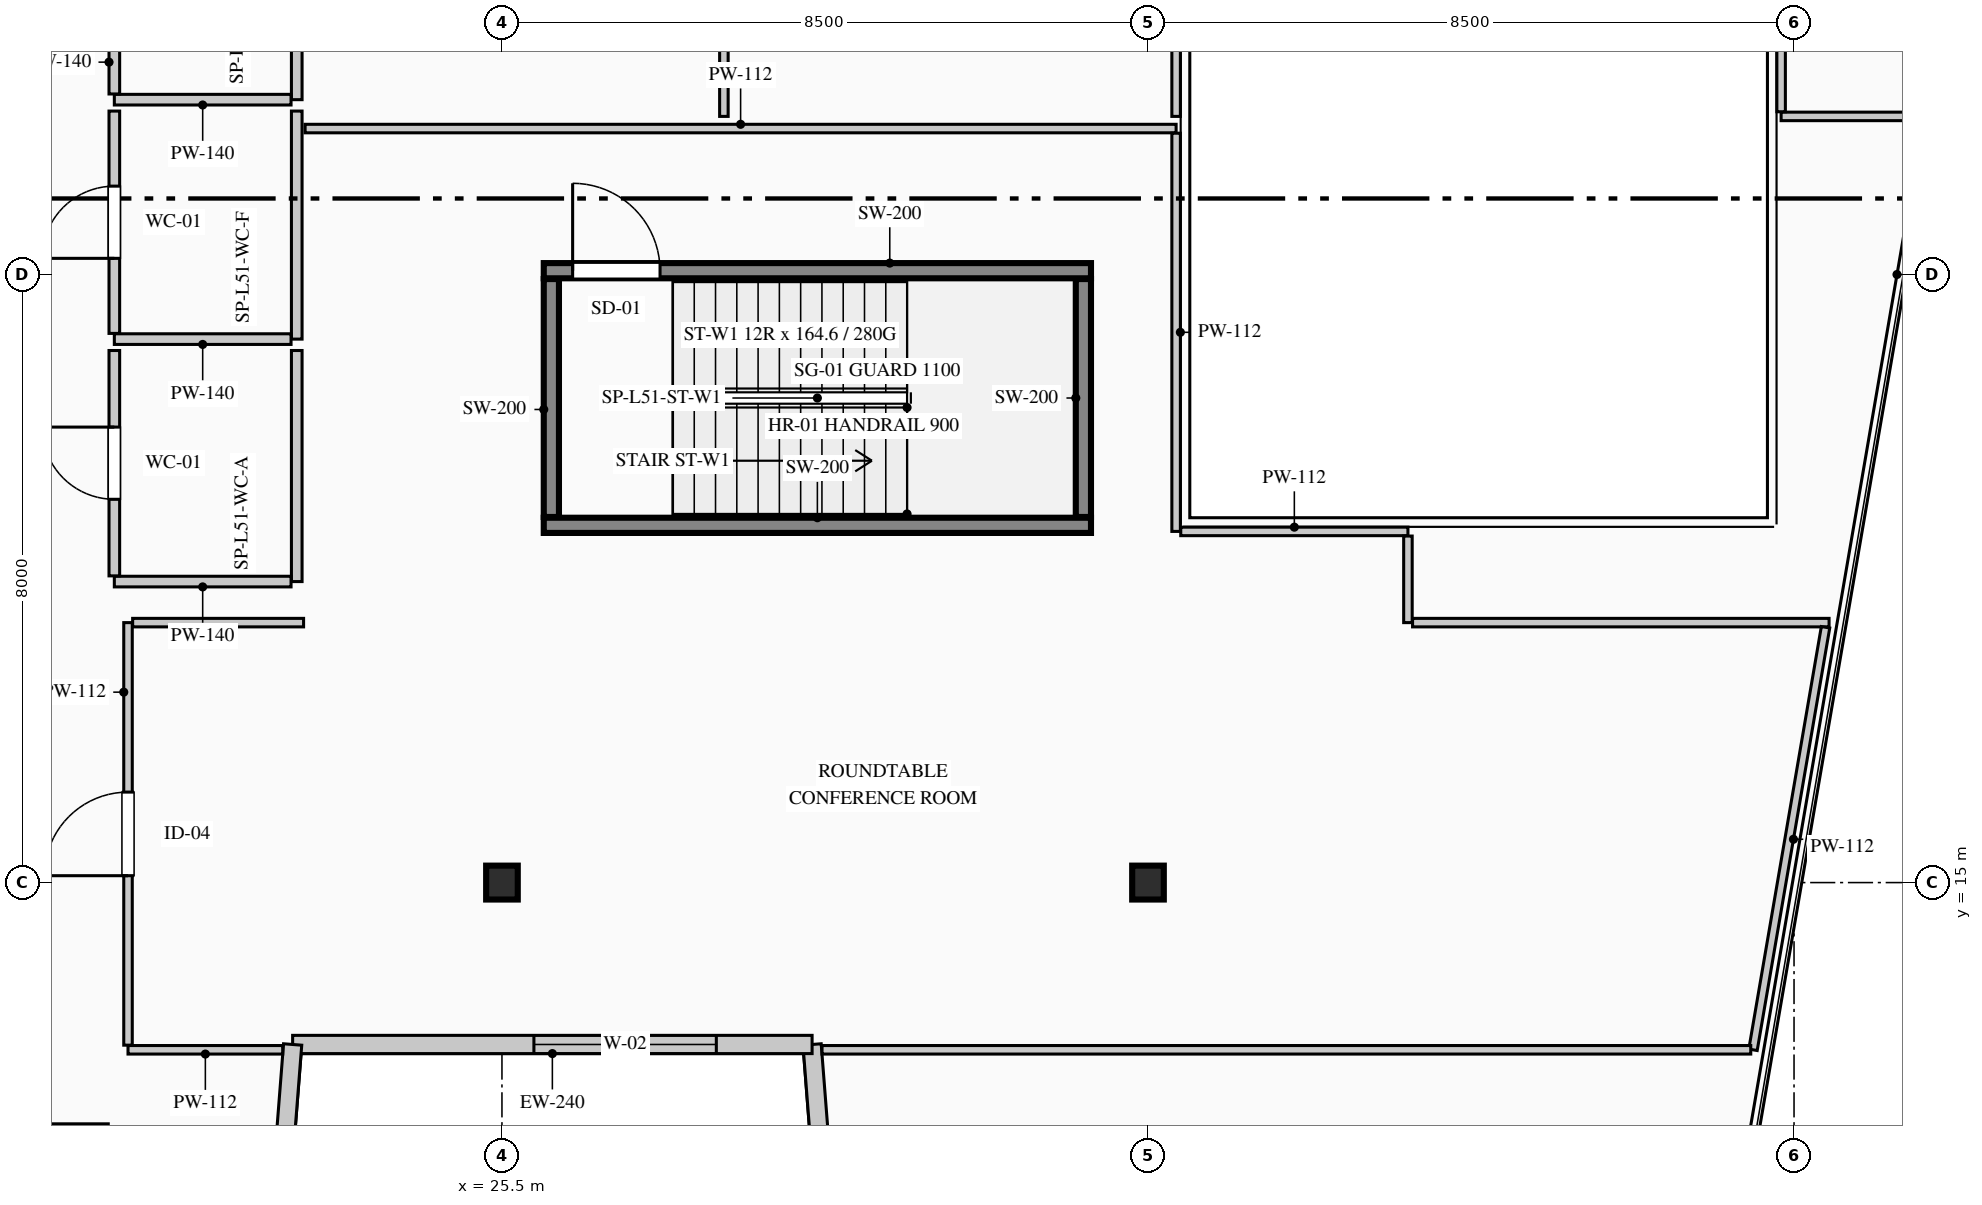
"""IFC4 building model, lengths in metres.
Left out: names, types, materials, properties, quantities, classifications, styles, units other than length and angle.
Written with IfcOpenShell. Run it as: python <this file> out.ifc"""

import sys

from ifc_helpers import new_model, si_unit, direction, frame, frame_2d, origin, origin_2d, place, context, subcontext, project, spatial, rectangle, i_section, extrude, element, fill, save


model = new_model("IFC4")
c1 = context("Model", 3, precision=1e-05, world=origin(), true_north=direction((0.0, 1.0)))
c2 = subcontext(c1, "Body", "Model", "MODEL_VIEW")
j1 = project(units=[si_unit("LENGTHUNIT", "METRE"), si_unit("PLANEANGLEUNIT", "RADIAN")], contexts=[c1])
p1 = place(None, origin())
s1 = spatial("IfcSite", under=j1, at=p1, CompositionType="ELEMENT")
p2 = place(p1, origin())
s2 = spatial("IfcBuilding", under=s1, at=p2, CompositionType="ELEMENT")
p3 = place(p2, frame((0.0, 0.0, 215.35)))
s3 = spatial("IfcBuildingStorey", under=s2, at=p3, CompositionType="ELEMENT", Elevation=215.35)
p4 = place(p3, frame((26.05, 19.7, 0.0), z_axis=(0.0, 0.0, 1.0), x_axis=(1.0, 0.0, 0.0)))
e1 = element("IfcWall", 1, at=p4, inside=s3, PredefinedType="SHEAR", context=c2, shape_type="SweptSolid", body=[
    extrude(rectangle(XDim=7.2, YDim=0.2, at=frame_2d((3.6, 0.0))), origin(), (0.0, 0.0, 1.0), 3.95),
])
p5 = place(p3, frame((26.05, 23.05, 0.0), z_axis=(0.0, 0.0, 1.0), x_axis=(1.0, 0.0, 0.0)))
e2 = element("IfcWall", 2, at=p5, inside=s3, PredefinedType="SHEAR", context=c2, shape_type="SweptSolid", body=[
    extrude(rectangle(XDim=7.2, YDim=0.2, at=frame_2d((3.6, 0.0))), origin(), (0.0, 0.0, 1.0), 3.95),
])
p6 = place(p5, frame((0.38, 0.0, 0.0)))
e3 = element("IfcOpeningElement", 3, at=p6, cuts=e2, PredefinedType="OPENING", context=c2, shape_type="SweptSolid", body=[
    extrude(rectangle(XDim=1.15, YDim=2.2, at=frame_2d((0.575, 1.1))), frame((0.0, 0.11, 0.0), z_axis=(0.0, -1.0, 0.0), x_axis=(1.0, 0.0, 0.0)), (0.0, 0.0, 1.0), 0.22),
])
for number, where, z_axis, x_axis in (
    (4, (26.15, 19.81, 0.0), (0.0, 0.0, 1.0), (0.0, 1.0, 0.0)),
    (5, (33.15, 19.81, 0.0), (0.0, 0.0, 1.0), (0.0, 1.0, 0.0)),
):
    element("IfcWall", number, at=place(p3, frame(where, z_axis=z_axis, x_axis=x_axis)), inside=s3, PredefinedType="SHEAR", context=c2, shape_type="SweptSolid", body=[
        extrude(rectangle(XDim=3.13, YDim=0.2, at=frame_2d((1.565, 0.0))), origin(), (0.0, 0.0, 1.0), 3.95),
    ])
for number, where, z_axis, x_axis in (
    (6, (25.5, 15.0, 0.0), (0.0, 0.0, 1.0), (1.0, 0.0, 0.0)),
    (7, (34.0, 15.0, 0.0), (0.0, 0.0, 1.0), (1.0, 0.0, 0.0)),
):
    element("IfcColumn", number, at=place(p3, frame(where, z_axis=z_axis, x_axis=x_axis)), inside=s3, PredefinedType="COLUMN", context=c2, shape_type="SweptSolid", body=[
        extrude(i_section(OverallWidth=0.416, OverallDepth=0.446, WebThickness=0.039, FlangeThickness=0.063, FilletRadius=0.015, at=origin_2d()), origin(), (0.0, 0.0, 1.0), 3.95),
    ])
p7 = place(p3, frame((30.381, 2.62, 0.0), z_axis=(0.0, 0.0, 1.0), x_axis=(-0.077816860153, 0.996967670627, 0.0)))
e8 = element("IfcWall", 8, at=p7, inside=s3, PredefinedType="STANDARD", context=c2, shape_type="SweptSolid", body=[
    extrude(rectangle(XDim=10.281, YDim=0.24, at=frame_2d((5.141, 0.0))), origin(), (0.0, 0.0, 1.0), 3.7),
])
p8 = place(p7, frame((5.38, 0.0, 0.9)))
e9 = element("IfcOpeningElement", 9, at=p8, cuts=e8, PredefinedType="OPENING", context=c2, shape_type="SweptSolid", body=[
    extrude(rectangle(XDim=2.4, YDim=2.1, at=frame_2d((1.2, 1.05))), frame((0.0, 0.13, 0.0), z_axis=(0.0, -1.0, 0.0), x_axis=(1.0, 0.0, 0.0)), (0.0, 0.0, 1.0), 0.26),
])
p9 = place(p3, frame((29.581, 12.87, 0.0), z_axis=(0.0, 0.0, 1.0), x_axis=(-1.0, 0.0, 0.0)))
e10 = element("IfcWall", 10, at=p9, inside=s3, PredefinedType="STANDARD", context=c2, shape_type="SweptSolid", body=[
    extrude(rectangle(XDim=6.834, YDim=0.24, at=frame_2d((3.417, 0.0))), origin(), (0.0, 0.0, 1.0), 3.7),
])
p10 = place(p9, frame((1.26, 0.0, 0.9)))
e11 = element("IfcOpeningElement", 11, at=p10, cuts=e10, PredefinedType="OPENING", context=c2, shape_type="SweptSolid", body=[
    extrude(rectangle(XDim=2.4, YDim=2.1, at=frame_2d((1.2, 1.05))), frame((0.0, 0.13, 0.0), z_axis=(0.0, -1.0, 0.0), x_axis=(1.0, 0.0, 0.0)), (0.0, 0.0, 1.0), 0.26),
])
p11 = place(p3, frame((22.746, 12.87, 0.0), z_axis=(0.0, 0.0, 1.0), x_axis=(-0.077816860153, -0.996967670627, 0.0)))
e12 = element("IfcWall", 12, at=p11, inside=s3, PredefinedType="STANDARD", context=c2, shape_type="SweptSolid", body=[
    extrude(rectangle(XDim=10.281, YDim=0.24, at=frame_2d((5.141, 0.0))), origin(), (0.0, 0.0, 1.0), 3.7),
])
p12 = place(p11, frame((2.501, 0.0, 0.9)))
e13 = element("IfcOpeningElement", 13, at=p12, cuts=e12, PredefinedType="OPENING", context=c2, shape_type="SweptSolid", body=[
    extrude(rectangle(XDim=2.4, YDim=2.1, at=frame_2d((1.2, 1.05))), frame((0.0, 0.13, 0.0), z_axis=(0.0, -1.0, 0.0), x_axis=(1.0, 0.0, 0.0)), (0.0, 0.0, 1.0), 0.26),
])
p13 = place(p3, frame((22.8, 28.95, 0.0), z_axis=(0.0, 0.0, 1.0), x_axis=(0.0, -1.0, 0.0)))
e14 = element("IfcWall", 14, at=p13, inside=s3, PredefinedType="PARTITIONING", context=c2, shape_type="SweptSolid", body=[
    extrude(rectangle(XDim=3.65, YDim=0.14, at=frame_2d((1.825, 0.0))), origin(), (0.0, 0.0, 1.0), 3.325),
])
p14 = place(p3, frame((22.725, 25.3, 0.0), z_axis=(0.0, 0.0, 1.0), x_axis=(-1.0, 0.0, 0.0)))
e15 = element("IfcWall", 15, at=p14, inside=s3, PredefinedType="PARTITIONING", context=c2, shape_type="SweptSolid", body=[
    extrude(rectangle(XDim=2.325, YDim=0.14, at=frame_2d((1.163, 0.0))), origin(), (0.0, 0.0, 1.0), 3.7),
])
p15 = place(p3, frame((20.4, 25.375, 0.0), z_axis=(0.0, 0.0, 1.0), x_axis=(0.0, 1.0, 0.0)))
e16 = element("IfcWall", 16, at=p15, inside=s3, PredefinedType="PARTITIONING", context=c2, shape_type="SweptSolid", body=[
    extrude(rectangle(XDim=3.575, YDim=0.14, at=frame_2d((1.788, 0.0))), origin(), (0.0, 0.0, 1.0), 3.7),
])
p16 = place(p15, frame((1.312, 0.0, 0.0)))
e17 = element("IfcOpeningElement", 17, at=p16, cuts=e16, PredefinedType="OPENING", context=c2, shape_type="SweptSolid", body=[
    extrude(rectangle(XDim=0.95, YDim=2.15, at=frame_2d((0.475, 1.075))), frame((0.0, 0.08, 0.0), z_axis=(0.0, -1.0, 0.0), x_axis=(1.0, 0.0, 0.0)), (0.0, 0.0, 1.0), 0.16),
])
p17 = place(p3, frame((22.8, 25.15, 0.0), z_axis=(0.0, 0.0, 1.0), x_axis=(0.0, -1.0, 0.0)))
e18 = element("IfcWall", 18, at=p17, inside=s3, PredefinedType="PARTITIONING", context=c2, shape_type="SweptSolid", body=[
    extrude(rectangle(XDim=3.0, YDim=0.14, at=frame_2d((1.5, 0.0))), origin(), (0.0, 0.0, 1.0), 3.325),
])
p18 = place(p3, frame((22.725, 22.15, 0.0), z_axis=(0.0, 0.0, 1.0), x_axis=(-1.0, 0.0, 0.0)))
e19 = element("IfcWall", 19, at=p18, inside=s3, PredefinedType="PARTITIONING", context=c2, shape_type="SweptSolid", body=[
    extrude(rectangle(XDim=2.325, YDim=0.14, at=frame_2d((1.163, 0.0))), origin(), (0.0, 0.0, 1.0), 3.7),
])
p19 = place(p3, frame((20.4, 22.225, 0.0), z_axis=(0.0, 0.0, 1.0), x_axis=(0.0, 1.0, 0.0)))
e20 = element("IfcWall", 20, at=p19, inside=s3, PredefinedType="PARTITIONING", context=c2, shape_type="SweptSolid", body=[
    extrude(rectangle(XDim=2.925, YDim=0.14, at=frame_2d((1.462, 0.0))), origin(), (0.0, 0.0, 1.0), 3.7),
])
p20 = place(p19, frame((0.988, 0.0, 0.0)))
e21 = element("IfcOpeningElement", 21, at=p20, cuts=e20, PredefinedType="OPENING", context=c2, shape_type="SweptSolid", body=[
    extrude(rectangle(XDim=0.95, YDim=2.15, at=frame_2d((0.475, 1.075))), frame((0.0, 0.08, 0.0), z_axis=(0.0, -1.0, 0.0), x_axis=(1.0, 0.0, 0.0)), (0.0, 0.0, 1.0), 0.16),
])
p21 = place(p3, frame((22.8, 22.0, 0.0), z_axis=(0.0, 0.0, 1.0), x_axis=(0.0, -1.0, 0.0)))
e22 = element("IfcWall", 22, at=p21, inside=s3, PredefinedType="PARTITIONING", context=c2, shape_type="SweptSolid", body=[
    extrude(rectangle(XDim=3.04, YDim=0.14, at=frame_2d((1.52, 0.0))), origin(), (0.0, 0.0, 1.0), 3.325),
])
p22 = place(p3, frame((22.725, 18.96, 0.0), z_axis=(0.0, 0.0, 1.0), x_axis=(-1.0, 0.0, 0.0)))
e23 = element("IfcWall", 23, at=p22, inside=s3, PredefinedType="PARTITIONING", context=c2, shape_type="SweptSolid", body=[
    extrude(rectangle(XDim=2.325, YDim=0.14, at=frame_2d((1.163, 0.0))), origin(), (0.0, 0.0, 1.0), 3.7),
])
p23 = place(p3, frame((20.4, 19.035, 0.0), z_axis=(0.0, 0.0, 1.0), x_axis=(0.0, 1.0, 0.0)))
e24 = element("IfcWall", 24, at=p23, inside=s3, PredefinedType="PARTITIONING", context=c2, shape_type="SweptSolid", body=[
    extrude(rectangle(XDim=2.965, YDim=0.14, at=frame_2d((1.482, 0.0))), origin(), (0.0, 0.0, 1.0), 3.7),
])
p24 = place(p23, frame((1.008, 0.0, 0.0)))
e25 = element("IfcOpeningElement", 25, at=p24, cuts=e24, PredefinedType="OPENING", context=c2, shape_type="SweptSolid", body=[
    extrude(rectangle(XDim=0.95, YDim=2.15, at=frame_2d((0.475, 1.075))), frame((0.0, 0.08, 0.0), z_axis=(0.0, -1.0, 0.0), x_axis=(1.0, 0.0, 0.0)), (0.0, 0.0, 1.0), 0.16),
])
p25 = place(p3, frame((11.341, 11.77, 0.0), z_axis=(0.0, 0.0, 1.0), x_axis=(1.0, 0.0, 0.0)))
e26 = element("IfcWall", 26, at=p25, inside=s3, PredefinedType="PARTITIONING", context=c2, shape_type="SweptSolid", body=[
    extrude(rectangle(XDim=8.979, YDim=0.112, at=frame_2d((4.49, 0.0))), origin(), (0.0, 0.0, 1.0), 3.7),
])
p26 = place(p25, frame((3.939, 0.0, 0.0)))
e27 = element("IfcOpeningElement", 27, at=p26, cuts=e26, PredefinedType="OPENING", context=c2, shape_type="SweptSolid", body=[
    extrude(rectangle(XDim=1.1, YDim=2.2, at=frame_2d((0.55, 1.1))), frame((0.0, 0.066, 0.0), z_axis=(0.0, -1.0, 0.0), x_axis=(1.0, 0.0, 0.0)), (0.0, 0.0, 1.0), 0.132),
])
p27 = place(p3, frame((22.615, 12.8, 0.0), z_axis=(0.0, 0.0, 1.0), x_axis=(-1.0, 0.0, 0.0)))
e28 = element("IfcWall", 28, at=p27, inside=s3, PredefinedType="PARTITIONING", context=c2, shape_type="SweptSolid", body=[
    extrude(rectangle(XDim=2.035, YDim=0.112, at=frame_2d((1.018, 0.0))), origin(), (0.0, 0.0, 1.0), 3.7),
])
p28 = place(p3, frame((20.58, 12.861, 0.0), z_axis=(0.0, 0.0, 1.0), x_axis=(0.0, 1.0, 0.0)))
e29 = element("IfcWall", 29, at=p28, inside=s3, PredefinedType="PARTITIONING", context=c2, shape_type="SweptSolid", body=[
    extrude(rectangle(XDim=5.559, YDim=0.112, at=frame_2d((2.779, 0.0))), origin(), (0.0, 0.0, 1.0), 3.7),
])
p29 = place(p28, frame((2.229, 0.0, 0.0)))
e30 = element("IfcOpeningElement", 30, at=p29, cuts=e29, PredefinedType="OPENING", context=c2, shape_type="SweptSolid", body=[
    extrude(rectangle(XDim=1.1, YDim=2.2, at=frame_2d((0.55, 1.1))), frame((0.0, 0.066, 0.0), z_axis=(0.0, -1.0, 0.0), x_axis=(1.0, 0.0, 0.0)), (0.0, 0.0, 1.0), 0.132),
])
p30 = place(p3, frame((20.641, 18.42, 0.0), z_axis=(0.0, 0.0, 1.0), x_axis=(1.0, 0.0, 0.0)))
e31 = element("IfcWall", 31, at=p30, inside=s3, PredefinedType="PARTITIONING", context=c2, shape_type="SweptSolid", body=[
    extrude(rectangle(XDim=2.249, YDim=0.112, at=frame_2d((1.125, 0.0))), origin(), (0.0, 0.0, 1.0), 3.7),
])
p31 = place(p3, frame((22.91, 24.92, 0.0), z_axis=(0.0, 0.0, 1.0), x_axis=(1.0, 0.0, 0.0)))
e32 = element("IfcWall", 32, at=p31, inside=s3, PredefinedType="PARTITIONING", context=c2, shape_type="SweptSolid", body=[
    extrude(rectangle(XDim=11.46, YDim=0.112, at=frame_2d((5.73, 0.0))), origin(), (0.0, 0.0, 1.0), 3.325),
])
p32 = place(p3, frame((34.37, 24.859, 0.0), z_axis=(0.0, 0.0, 1.0), x_axis=(0.0, -1.0, 0.0)))
e33 = element("IfcWall", 33, at=p32, inside=s3, PredefinedType="PARTITIONING", context=c2, shape_type="SweptSolid", body=[
    extrude(rectangle(XDim=5.239, YDim=0.112, at=frame_2d((2.619, 0.0))), origin(), (0.0, 0.0, 1.0), 3.7),
])
p33 = place(p3, frame((34.431, 19.62, 0.0), z_axis=(0.0, 0.0, 1.0), x_axis=(1.0, 0.0, 0.0)))
e34 = element("IfcWall", 34, at=p33, inside=s3, PredefinedType="PARTITIONING", context=c2, shape_type="SweptSolid", body=[
    extrude(rectangle(XDim=2.989, YDim=0.112, at=frame_2d((1.495, 0.0))), origin(), (0.0, 0.0, 1.0), 3.7),
])
p34 = place(p3, frame((37.42, 19.559, 0.0), z_axis=(0.0, 0.0, 1.0), x_axis=(0.0, -1.0, 0.0)))
e35 = element("IfcWall", 35, at=p34, inside=s3, PredefinedType="PARTITIONING", context=c2, shape_type="SweptSolid", body=[
    extrude(rectangle(XDim=1.139, YDim=0.112, at=frame_2d((0.57, 0.0))), origin(), (0.0, 0.0, 1.0), 3.7),
])
p35 = place(p3, frame((37.481, 18.42, 0.0), z_axis=(0.0, 0.0, 1.0), x_axis=(1.0, 0.0, 0.0)))
e36 = element("IfcWall", 36, at=p35, inside=s3, PredefinedType="PARTITIONING", context=c2, shape_type="SweptSolid", body=[
    extrude(rectangle(XDim=5.48, YDim=0.112, at=frame_2d((2.74, 0.0))), origin(), (0.0, 0.0, 1.0), 3.7),
])
p36 = place(p3, frame((42.915, 18.359, 0.0), z_axis=(0.0, 0.0, 1.0), x_axis=(-0.169247345334, -0.985573607651, 0.0)))
e37 = element("IfcWall", 37, at=p36, inside=s3, PredefinedType="PARTITIONING", context=c2, shape_type="SweptSolid", body=[
    extrude(rectangle(XDim=5.64, YDim=0.112, at=frame_2d((2.82, 0.0))), origin(), (0.0, 0.0, 1.0), 3.7),
])
p37 = place(p3, frame((41.93, 12.8, 0.0), z_axis=(0.0, 0.0, 1.0), x_axis=(-1.0, 0.0, 0.0)))
e38 = element("IfcWall", 38, at=p37, inside=s3, PredefinedType="PARTITIONING", context=c2, shape_type="SweptSolid", body=[
    extrude(rectangle(XDim=12.219, YDim=0.112, at=frame_2d((6.11, 0.0))), origin(), (0.0, 0.0, 1.0), 3.7),
])
p38 = place(p3, frame((28.42, 28.959, 0.0), z_axis=(0.0, 0.0, 1.0), x_axis=(0.0, -1.0, 0.0)))
e39 = element("IfcWall", 39, at=p38, inside=s3, PredefinedType="PARTITIONING", context=c2, shape_type="SweptSolid", body=[
    extrude(rectangle(XDim=3.879, YDim=0.112, at=frame_2d((1.939, 0.0))), origin(), (0.0, 0.0, 1.0), 3.7),
])
p39 = place(p3, frame((34.37, 28.6, 0.0), z_axis=(0.0, 0.0, 1.0), x_axis=(0.0, -1.0, 0.0)))
e40 = element("IfcWall", 40, at=p39, inside=s3, PredefinedType="PARTITIONING", context=c2, shape_type="SweptSolid", body=[
    extrude(rectangle(XDim=3.52, YDim=0.112, at=frame_2d((1.76, 0.0))), origin(), (0.0, 0.0, 1.0), 3.7),
])
p40 = place(p3, frame((44.041, 25.08, 0.0), z_axis=(0.0, 0.0, 1.0), x_axis=(-1.0, 0.0, 0.0)))
e41 = element("IfcWall", 41, at=p40, inside=s3, PredefinedType="PARTITIONING", context=c2, shape_type="SweptSolid", body=[
    extrude(rectangle(XDim=1.71, YDim=0.112, at=frame_2d((0.855, 0.0))), origin(), (0.0, 0.0, 1.0), 3.7),
])
p41 = place(p3, frame((42.33, 25.141, 0.0), z_axis=(0.0, 0.0, 1.0), x_axis=(0.0, 1.0, 0.0)))
e42 = element("IfcWall", 42, at=p41, inside=s3, PredefinedType="PARTITIONING", context=c2, shape_type="SweptSolid", body=[
    extrude(rectangle(XDim=3.489, YDim=0.112, at=frame_2d((1.744, 0.0))), origin(), (0.0, 0.0, 1.0), 3.7),
])
p42 = place(p10, origin())
e43 = element("IfcWindow", 43, at=p42, inside=s3, PartitioningType="DOUBLE_PANEL_VERTICAL", PredefinedType="WINDOW", context=c2, shape_type="SweptSolid", body=[
    extrude(rectangle(XDim=2.4, YDim=2.1, at=frame_2d((1.2, 1.05))), frame((0.0, 0.03, 0.0), z_axis=(0.0, -1.0, 0.0), x_axis=(1.0, 0.0, 0.0)), (0.0, 0.0, 1.0), 0.06),
])
fill(e11, e43)
p43 = place(p6, origin())
e44 = element("IfcDoor", 44, at=p43, inside=s3, OperationType="SINGLE_SWING_LEFT", PredefinedType="DOOR", context=c2, shape_type="SweptSolid", body=[
    extrude(rectangle(XDim=1.15, YDim=2.2, at=frame_2d((0.575, 1.1))), frame((0.0, 0.025, 0.0), z_axis=(0.0, -1.0, 0.0), x_axis=(1.0, 0.0, 0.0)), (0.0, 0.0, 1.0), 0.05),
])
fill(e3, e44)
p44 = place(p20, origin())
e45 = element("IfcDoor", 45, at=p44, inside=s3, OperationType="SINGLE_SWING_LEFT", PredefinedType="DOOR", context=c2, shape_type="SweptSolid", body=[
    extrude(rectangle(XDim=0.95, YDim=2.15, at=frame_2d((0.475, 1.075))), frame((0.0, 0.025, 0.0), z_axis=(0.0, -1.0, 0.0), x_axis=(1.0, 0.0, 0.0)), (0.0, 0.0, 1.0), 0.05),
])
fill(e21, e45)
p45 = place(p24, origin())
e46 = element("IfcDoor", 46, at=p45, inside=s3, OperationType="SINGLE_SWING_RIGHT", PredefinedType="DOOR", context=c2, shape_type="SweptSolid", body=[
    extrude(rectangle(XDim=0.95, YDim=2.15, at=frame_2d((0.475, 1.075))), frame((0.0, 0.025, 0.0), z_axis=(0.0, -1.0, 0.0), x_axis=(1.0, 0.0, 0.0)), (0.0, 0.0, 1.0), 0.05),
])
fill(e25, e46)
p46 = place(p29, origin())
e47 = element("IfcDoor", 47, at=p46, inside=s3, OperationType="SINGLE_SWING_LEFT", PredefinedType="DOOR", context=c2, shape_type="SweptSolid", body=[
    extrude(rectangle(XDim=1.1, YDim=2.2, at=frame_2d((0.55, 1.1))), frame((0.0, 0.025, 0.0), z_axis=(0.0, -1.0, 0.0), x_axis=(1.0, 0.0, 0.0)), (0.0, 0.0, 1.0), 0.05),
])
fill(e30, e47)
save(model, sys.argv[1])
